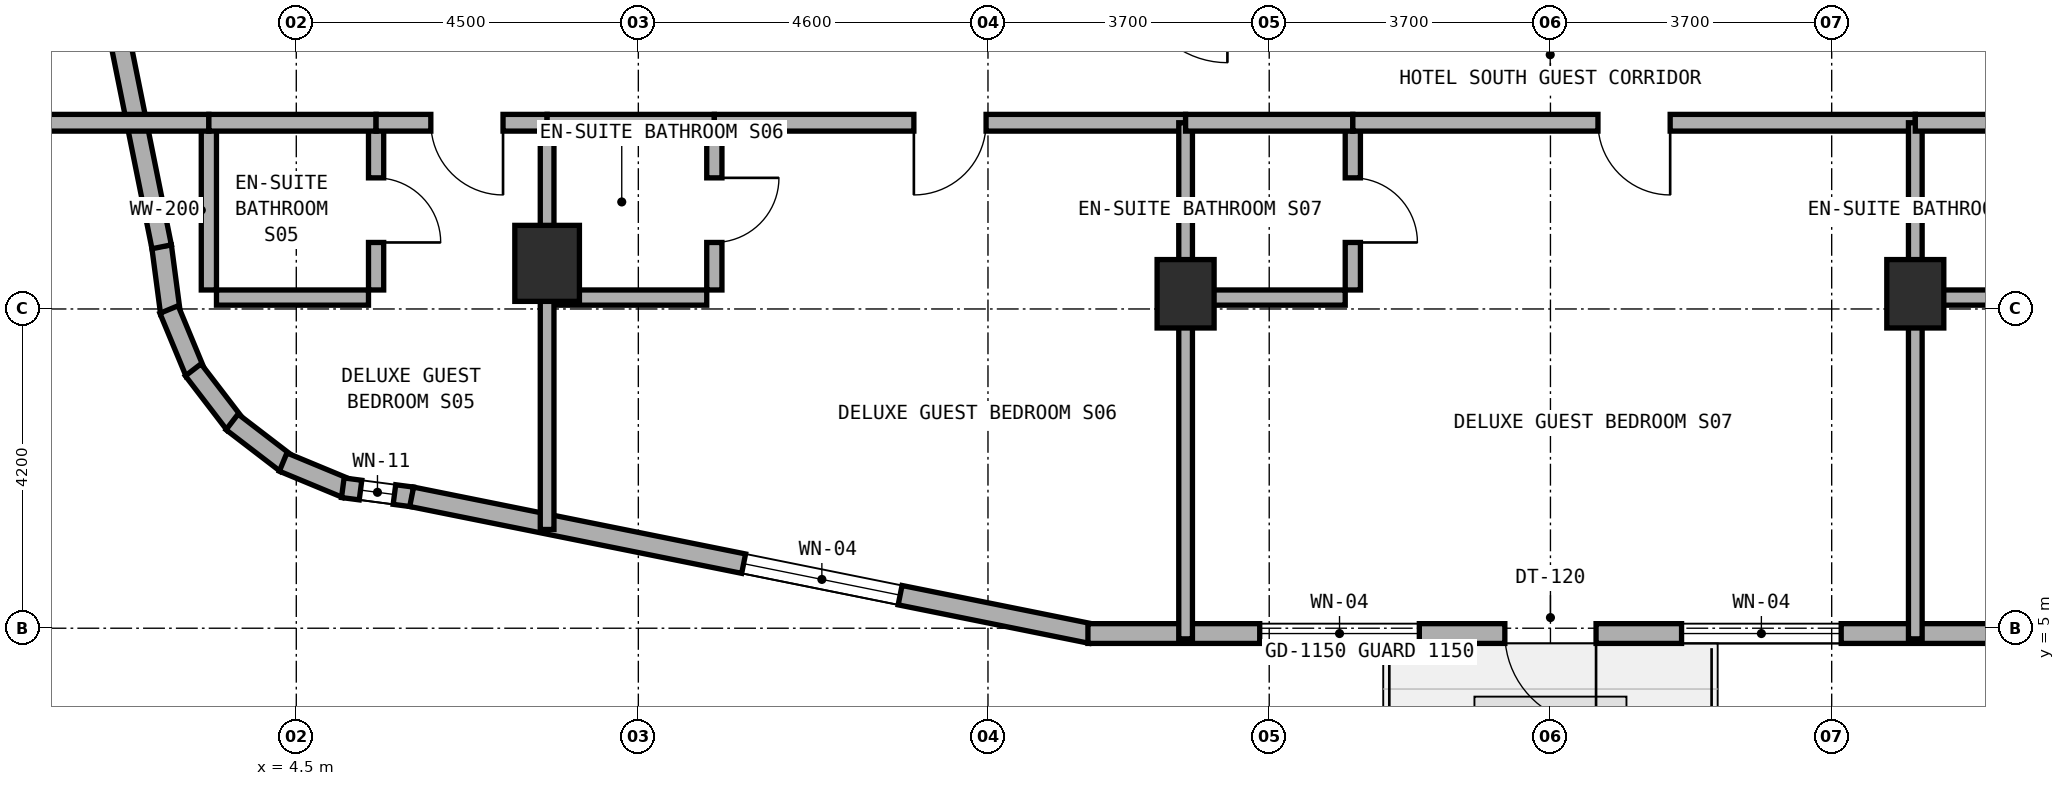
"""IFC4 building model, lengths in metres.
Left out: names, types, materials, properties, quantities, classifications, styles, units other than length and angle.
Written with IfcOpenShell. Run it as: python <this file> out.ifc"""

import sys

from ifc_helpers import new_model, si_unit, direction, frame, frame_2d, origin, origin_2d, place, context, subcontext, project, spatial, rectangle, extrude, element, fill, save


model = new_model("IFC4")
c1 = context("Model", 3, precision=1e-05, world=origin(), true_north=direction((0.0, 1.0)))
c2 = subcontext(c1, "Body", "Model", "MODEL_VIEW")
j1 = project(units=[si_unit("LENGTHUNIT", "METRE"), si_unit("PLANEANGLEUNIT", "RADIAN")], contexts=[c1])
p1 = place(None, origin())
s1 = spatial("IfcSite", under=j1, at=p1, CompositionType="ELEMENT")
p2 = place(p1, origin())
s2 = spatial("IfcBuilding", under=s1, at=p2, CompositionType="ELEMENT")
p3 = place(p2, frame((0.0, 0.0, 155.5)))
s3 = spatial("IfcBuildingStorey", under=s2, at=p3, CompositionType="ELEMENT", Elevation=155.5)
for number, where, z_axis, x_axis in (
    (1, (16.2, 9.4, 0.0), (0.0, 0.0, 1.0), (1.0, 0.0, 0.0)),
    (2, (25.8, 9.4, 0.0), (0.0, 0.0, 1.0), (1.0, 0.0, 0.0)),
):
    element("IfcColumn", number, at=place(p3, frame(where, z_axis=z_axis, x_axis=x_axis)), inside=s3, PredefinedType="COLUMN", context=c2, shape_type="SweptSolid", body=[
        extrude(rectangle(XDim=0.75, YDim=0.9, at=origin_2d()), origin(), (0.0, 0.0, 1.0), 3.5),
    ])
p4 = place(p3, frame((7.8, 9.8, 0.0), z_axis=(0.0, 0.0, 1.0), x_axis=(1.0, 0.0, 0.0)))
e3 = element("IfcColumn", 3, at=p4, inside=s3, PredefinedType="COLUMN", context=c2, shape_type="SweptSolid", body=[
    extrude(rectangle(XDim=0.85, YDim=1.0, at=origin_2d()), origin(), (0.0, 0.0, 1.0), 3.5),
])
p5 = place(p3, frame((2.728, 10.025, 0.0), z_axis=(0.0, 0.0, 1.0), x_axis=(0.130953706898, -0.991388484223, 0.0)))
e4 = element("IfcWall", 4, at=p5, inside=s3, PredefinedType="STANDARD", context=c2, shape_type="SweptSolid", body=[
    extrude(rectangle(XDim=0.885, YDim=0.26, at=frame_2d((0.443, 0.0))), origin(), (0.0, 0.0, 1.0), 3.22),
])
p6 = place(p3, frame((2.826, 9.193, 0.0), z_axis=(0.0, 0.0, 1.0), x_axis=(0.383290660547, -0.923627776508, 0.0)))
e5 = element("IfcWall", 5, at=p6, inside=s3, PredefinedType="STANDARD", context=c2, shape_type="SweptSolid", body=[
    extrude(rectangle(XDim=0.903, YDim=0.26, at=frame_2d((0.452, 0.0))), origin(), (0.0, 0.0, 1.0), 3.22),
])
p7 = place(p3, frame((3.144, 8.399, 0.0), z_axis=(0.0, 0.0, 1.0), x_axis=(0.608624690463, -0.793458244748, 0.0)))
e6 = element("IfcWall", 6, at=p7, inside=s3, PredefinedType="STANDARD", context=c2, shape_type="SweptSolid", body=[
    extrude(rectangle(XDim=0.902, YDim=0.26, at=frame_2d((0.451, 0.0))), origin(), (0.0, 0.0, 1.0), 3.22),
])
p8 = place(p3, frame((3.655, 7.714, 0.0), z_axis=(0.0, 0.0, 1.0), x_axis=(0.793558456666, -0.608494022858, 0.0)))
e7 = element("IfcWall", 7, at=p8, inside=s3, PredefinedType="STANDARD", context=c2, shape_type="SweptSolid", body=[
    extrude(rectangle(XDim=0.902, YDim=0.26, at=frame_2d((0.451, 0.0))), origin(), (0.0, 0.0, 1.0), 3.22),
])
p9 = place(p3, frame((4.327, 7.186, 0.0), z_axis=(0.0, 0.0, 1.0), x_axis=(0.923683767999, -0.383155708213, 0.0)))
e8 = element("IfcWall", 8, at=p9, inside=s3, PredefinedType="STANDARD", context=c2, shape_type="SweptSolid", body=[
    extrude(rectangle(XDim=0.903, YDim=0.26, at=frame_2d((0.451, 0.0))), origin(), (0.0, 0.0, 1.0), 3.22),
])
p10 = place(p3, frame((5.112, 6.848, 0.0), z_axis=(0.0, 0.0, 1.0), x_axis=(0.991487658083, -0.130200706103, 0.0)))
e9 = element("IfcWall", 9, at=p10, inside=s3, PredefinedType="STANDARD", context=c2, shape_type="SweptSolid", body=[
    extrude(rectangle(XDim=0.921, YDim=0.26, at=frame_2d((0.46, 0.0))), origin(), (0.0, 0.0, 1.0), 3.22),
])
p11 = place(p10, frame((0.235, 0.0, 0.85)))
e10 = element("IfcOpeningElement", 10, at=p11, cuts=e9, PredefinedType="OPENING", context=c2, shape_type="SweptSolid", body=[
    extrude(rectangle(XDim=0.45, YDim=1.5, at=frame_2d((0.225, 0.75))), frame((0.0, 0.14, 0.0), z_axis=(0.0, -1.0, 0.0), x_axis=(1.0, 0.0, 0.0)), (0.0, 0.0, 1.0), 0.28),
])
p12 = place(p3, frame((6.018, 6.729, 0.0), z_axis=(0.0, 0.0, 1.0), x_axis=(0.980317172899, -0.197429077186, 0.0)))
e11 = element("IfcWall", 11, at=p12, inside=s3, PredefinedType="STANDARD", context=c2, shape_type="SweptSolid", body=[
    extrude(rectangle(XDim=9.117, YDim=0.26, at=frame_2d((4.559, 0.0))), origin(), (0.0, 0.0, 1.0), 3.22),
])
p13 = place(p12, frame((4.455, 0.0, 0.85)))
e12 = element("IfcOpeningElement", 12, at=p13, cuts=e11, PredefinedType="OPENING", context=c2, shape_type="SweptSolid", body=[
    extrude(rectangle(XDim=2.1, YDim=1.5, at=frame_2d((1.05, 0.75))), frame((0.0, 0.14, 0.0), z_axis=(0.0, -1.0, 0.0), x_axis=(1.0, 0.0, 0.0)), (0.0, 0.0, 1.0), 0.28),
])
p14 = place(p3, frame((14.915, 4.93, 0.0), z_axis=(0.0, 0.0, 1.0), x_axis=(1.0, 0.0, 0.0)))
e13 = element("IfcWall", 13, at=p14, inside=s3, PredefinedType="STANDARD", context=c2, shape_type="SweptSolid", body=[
    extrude(rectangle(XDim=12.135, YDim=0.26, at=frame_2d((6.067, 0.0))), origin(), (0.0, 0.0, 1.0), 3.22),
])
p15 = place(p14, frame((5.485, 0.0, 0.0)))
e14 = element("IfcOpeningElement", 14, at=p15, cuts=e13, PredefinedType="OPENING", context=c2, shape_type="SweptSolid", body=[
    extrude(rectangle(XDim=1.2, YDim=2.15, at=frame_2d((0.6, 1.075))), frame((0.0, 0.14, 0.0), z_axis=(0.0, -1.0, 0.0), x_axis=(1.0, 0.0, 0.0)), (0.0, 0.0, 1.0), 0.28),
])
p16 = place(p14, frame((2.26, 0.0, 0.85)))
e15 = element("IfcOpeningElement", 15, at=p16, cuts=e13, PredefinedType="OPENING", context=c2, shape_type="SweptSolid", body=[
    extrude(rectangle(XDim=2.1, YDim=1.5, at=frame_2d((1.05, 0.75))), frame((0.0, 0.14, 0.0), z_axis=(0.0, -1.0, 0.0), x_axis=(1.0, 0.0, 0.0)), (0.0, 0.0, 1.0), 0.28),
])
p17 = place(p14, frame((7.81, 0.0, 0.85)))
e16 = element("IfcOpeningElement", 16, at=p17, cuts=e13, PredefinedType="OPENING", context=c2, shape_type="SweptSolid", body=[
    extrude(rectangle(XDim=2.1, YDim=1.5, at=frame_2d((1.05, 0.75))), frame((0.0, 0.14, 0.0), z_axis=(0.0, -1.0, 0.0), x_axis=(1.0, 0.0, 0.0)), (0.0, 0.0, 1.0), 0.28),
])
p18 = place(p3, frame((0.916, 19.02, 0.0), z_axis=(0.0, 0.0, 1.0), x_axis=(0.197435082048, -0.980315963543, 0.0)))
e17 = element("IfcWall", 17, at=p18, inside=s3, PredefinedType="STANDARD", context=c2, shape_type="SweptSolid", body=[
    extrude(rectangle(XDim=9.183, YDim=0.26, at=frame_2d((4.591, 0.0))), origin(), (0.0, 0.0, 1.0), 3.22),
])
p19 = place(p18, frame((2.647, 0.0, 0.85)))
e18 = element("IfcOpeningElement", 18, at=p19, cuts=e17, PredefinedType="OPENING", context=c2, shape_type="SweptSolid", body=[
    extrude(rectangle(XDim=2.1, YDim=1.5, at=frame_2d((1.05, 0.75))), frame((0.0, 0.14, 0.0), z_axis=(0.0, -1.0, 0.0), x_axis=(1.0, 0.0, 0.0)), (0.0, 0.0, 1.0), 0.28),
])
p20 = place(p3, frame((5.55, 9.45, 0.0), z_axis=(0.0, 0.0, 1.0), x_axis=(0.0, 1.0, 0.0)))
e19 = element("IfcWall", 19, at=p20, inside=s3, PredefinedType="PLUMBINGWALL", context=c2, shape_type="SweptSolid", body=[
    extrude(rectangle(XDim=2.1, YDim=0.2, at=frame_2d((1.05, 0.0))), origin(), (0.0, 0.0, 1.0), 3.22),
])
p21 = place(p20, frame((0.625, 0.0, 0.0)))
e20 = element("IfcOpeningElement", 20, at=p21, cuts=e19, PredefinedType="OPENING", context=c2, shape_type="SweptSolid", body=[
    extrude(rectangle(XDim=0.85, YDim=2.1, at=frame_2d((0.425, 1.05))), frame((0.0, 0.11, 0.0), z_axis=(0.0, -1.0, 0.0), x_axis=(1.0, 0.0, 0.0)), (0.0, 0.0, 1.0), 0.22),
])
p22 = place(p3, frame((3.45, 9.35, 0.0), z_axis=(0.0, 0.0, 1.0), x_axis=(1.0, 0.0, 0.0)))
e21 = element("IfcWall", 21, at=p22, inside=s3, PredefinedType="PLUMBINGWALL", context=c2, shape_type="SweptSolid", body=[
    extrude(rectangle(XDim=2.0, YDim=0.2, at=frame_2d((1.0, 0.0))), origin(), (0.0, 0.0, 1.0), 3.22),
])
p23 = place(p3, frame((3.35, 9.45, 0.0), z_axis=(0.0, 0.0, 1.0), x_axis=(0.0, 1.0, 0.0)))
e22 = element("IfcWall", 22, at=p23, inside=s3, PredefinedType="PLUMBINGWALL", context=c2, shape_type="SweptSolid", body=[
    extrude(rectangle(XDim=2.1, YDim=0.2, at=frame_2d((1.05, 0.0))), origin(), (0.0, 0.0, 1.0), 3.22),
])
p24 = place(p3, frame((0.96, 11.65, 0.0), z_axis=(0.0, 0.0, 1.0), x_axis=(1.0, 0.0, 0.0)))
e23 = element("IfcWall", 23, at=p24, inside=s3, PredefinedType="SOLIDWALL", context=c2, shape_type="SweptSolid", body=[
    extrude(rectangle(XDim=2.39, YDim=0.22, at=frame_2d((1.195, 0.0))), origin(), (0.0, 0.0, 1.0), 3.22),
])
p25 = place(p3, frame((3.35, 11.65, 0.0), z_axis=(0.0, 0.0, 1.0), x_axis=(1.0, 0.0, 0.0)))
e24 = element("IfcWall", 24, at=p25, inside=s3, PredefinedType="SOLIDWALL", context=c2, shape_type="SweptSolid", body=[
    extrude(rectangle(XDim=2.2, YDim=0.22, at=frame_2d((1.1, 0.0))), origin(), (0.0, 0.0, 1.0), 3.22),
])
p26 = place(p3, frame((5.55, 11.65, 0.0), z_axis=(0.0, 0.0, 1.0), x_axis=(1.0, 0.0, 0.0)))
e25 = element("IfcWall", 25, at=p26, inside=s3, PredefinedType="SOLIDWALL", context=c2, shape_type="SweptSolid", body=[
    extrude(rectangle(XDim=2.25, YDim=0.22, at=frame_2d((1.125, 0.0))), origin(), (0.0, 0.0, 1.0), 2.795),
])
p27 = place(p26, frame((0.72, 0.0, 0.0)))
e26 = element("IfcOpeningElement", 26, at=p27, cuts=e25, PredefinedType="OPENING", context=c2, shape_type="SweptSolid", body=[
    extrude(rectangle(XDim=0.95, YDim=2.1, at=frame_2d((0.475, 1.05))), frame((0.0, 0.12, 0.0), z_axis=(0.0, -1.0, 0.0), x_axis=(1.0, 0.0, 0.0)), (0.0, 0.0, 1.0), 0.24),
])
p28 = place(p3, frame((7.8, 6.299, 0.0), z_axis=(0.0, 0.0, 1.0), x_axis=(0.0, 1.0, 0.0)))
e27 = element("IfcWall", 27, at=p28, inside=s3, PredefinedType="SOLIDWALL", context=c2, shape_type="SweptSolid", body=[
    extrude(rectangle(XDim=5.351, YDim=0.18, at=frame_2d((2.675, 0.0))), origin(), (0.0, 0.0, 1.0), 2.795),
])
p29 = place(p3, frame((10.0, 9.45, 0.0), z_axis=(0.0, 0.0, 1.0), x_axis=(0.0, 1.0, 0.0)))
e28 = element("IfcWall", 28, at=p29, inside=s3, PredefinedType="PLUMBINGWALL", context=c2, shape_type="SweptSolid", body=[
    extrude(rectangle(XDim=2.1, YDim=0.2, at=frame_2d((1.05, 0.0))), origin(), (0.0, 0.0, 1.0), 2.795),
])
p30 = place(p29, frame((0.625, 0.0, 0.0)))
e29 = element("IfcOpeningElement", 29, at=p30, cuts=e28, PredefinedType="OPENING", context=c2, shape_type="SweptSolid", body=[
    extrude(rectangle(XDim=0.85, YDim=2.1, at=frame_2d((0.425, 1.05))), frame((0.0, 0.11, 0.0), z_axis=(0.0, -1.0, 0.0), x_axis=(1.0, 0.0, 0.0)), (0.0, 0.0, 1.0), 0.22),
])
p31 = place(p3, frame((7.9, 9.35, 0.0), z_axis=(0.0, 0.0, 1.0), x_axis=(1.0, 0.0, 0.0)))
e30 = element("IfcWall", 30, at=p31, inside=s3, PredefinedType="PLUMBINGWALL", context=c2, shape_type="SweptSolid", body=[
    extrude(rectangle(XDim=2.0, YDim=0.2, at=frame_2d((1.0, 0.0))), origin(), (0.0, 0.0, 1.0), 3.22),
])
p32 = place(p3, frame((7.8, 11.65, 0.0), z_axis=(0.0, 0.0, 1.0), x_axis=(1.0, 0.0, 0.0)))
e31 = element("IfcWall", 31, at=p32, inside=s3, PredefinedType="SOLIDWALL", context=c2, shape_type="SweptSolid", body=[
    extrude(rectangle(XDim=2.2, YDim=0.22, at=frame_2d((1.1, 0.0))), origin(), (0.0, 0.0, 1.0), 2.795),
])
p33 = place(p3, frame((10.0, 11.65, 0.0), z_axis=(0.0, 0.0, 1.0), x_axis=(1.0, 0.0, 0.0)))
e32 = element("IfcWall", 32, at=p33, inside=s3, PredefinedType="SOLIDWALL", context=c2, shape_type="SweptSolid", body=[
    extrude(rectangle(XDim=6.2, YDim=0.22, at=frame_2d((3.1, 0.0))), origin(), (0.0, 0.0, 1.0), 2.795),
])
p34 = place(p33, frame((2.625, 0.0, 0.0)))
e33 = element("IfcOpeningElement", 33, at=p34, cuts=e32, PredefinedType="OPENING", context=c2, shape_type="SweptSolid", body=[
    extrude(rectangle(XDim=0.95, YDim=2.1, at=frame_2d((0.475, 1.05))), frame((0.0, 0.12, 0.0), z_axis=(0.0, -1.0, 0.0), x_axis=(1.0, 0.0, 0.0)), (0.0, 0.0, 1.0), 0.24),
])
p35 = place(p3, frame((16.2, 4.86, 0.0), z_axis=(0.0, 0.0, 1.0), x_axis=(0.0, 1.0, 0.0)))
e34 = element("IfcWall", 34, at=p35, inside=s3, PredefinedType="SOLIDWALL", context=c2, shape_type="SweptSolid", body=[
    extrude(rectangle(XDim=6.79, YDim=0.18, at=frame_2d((3.395, 0.0))), origin(), (0.0, 0.0, 1.0), 2.795),
])
p36 = place(p3, frame((18.4, 9.45, 0.0), z_axis=(0.0, 0.0, 1.0), x_axis=(0.0, 1.0, 0.0)))
e35 = element("IfcWall", 35, at=p36, inside=s3, PredefinedType="PLUMBINGWALL", context=c2, shape_type="SweptSolid", body=[
    extrude(rectangle(XDim=2.1, YDim=0.2, at=frame_2d((1.05, 0.0))), origin(), (0.0, 0.0, 1.0), 2.795),
])
p37 = place(p36, frame((0.625, 0.0, 0.0)))
e36 = element("IfcOpeningElement", 36, at=p37, cuts=e35, PredefinedType="OPENING", context=c2, shape_type="SweptSolid", body=[
    extrude(rectangle(XDim=0.85, YDim=2.1, at=frame_2d((0.425, 1.05))), frame((0.0, 0.11, 0.0), z_axis=(0.0, -1.0, 0.0), x_axis=(1.0, 0.0, 0.0)), (0.0, 0.0, 1.0), 0.22),
])
p38 = place(p3, frame((16.3, 9.35, 0.0), z_axis=(0.0, 0.0, 1.0), x_axis=(1.0, 0.0, 0.0)))
e37 = element("IfcWall", 37, at=p38, inside=s3, PredefinedType="PLUMBINGWALL", context=c2, shape_type="SweptSolid", body=[
    extrude(rectangle(XDim=2.0, YDim=0.2, at=frame_2d((1.0, 0.0))), origin(), (0.0, 0.0, 1.0), 2.835),
])
p39 = place(p3, frame((16.2, 11.65, 0.0), z_axis=(0.0, 0.0, 1.0), x_axis=(1.0, 0.0, 0.0)))
e38 = element("IfcWall", 38, at=p39, inside=s3, PredefinedType="SOLIDWALL", context=c2, shape_type="SweptSolid", body=[
    extrude(rectangle(XDim=2.2, YDim=0.22, at=frame_2d((1.1, 0.0))), origin(), (0.0, 0.0, 1.0), 2.795),
])
p40 = place(p3, frame((18.4, 11.65, 0.0), z_axis=(0.0, 0.0, 1.0), x_axis=(1.0, 0.0, 0.0)))
e39 = element("IfcWall", 39, at=p40, inside=s3, PredefinedType="SOLIDWALL", context=c2, shape_type="SweptSolid", body=[
    extrude(rectangle(XDim=7.4, YDim=0.22, at=frame_2d((3.7, 0.0))), origin(), (0.0, 0.0, 1.0), 2.795),
])
p41 = place(p40, frame((3.225, 0.0, 0.0)))
e40 = element("IfcOpeningElement", 40, at=p41, cuts=e39, PredefinedType="OPENING", context=c2, shape_type="SweptSolid", body=[
    extrude(rectangle(XDim=0.95, YDim=2.1, at=frame_2d((0.475, 1.05))), frame((0.0, 0.12, 0.0), z_axis=(0.0, -1.0, 0.0), x_axis=(1.0, 0.0, 0.0)), (0.0, 0.0, 1.0), 0.24),
])
p42 = place(p3, frame((25.8, 4.86, 0.0), z_axis=(0.0, 0.0, 1.0), x_axis=(0.0, 1.0, 0.0)))
e41 = element("IfcWall", 41, at=p42, inside=s3, PredefinedType="SOLIDWALL", context=c2, shape_type="SweptSolid", body=[
    extrude(rectangle(XDim=6.79, YDim=0.18, at=frame_2d((3.395, 0.0))), origin(), (0.0, 0.0, 1.0), 2.795),
])
p43 = place(p3, frame((25.9, 9.35, 0.0), z_axis=(0.0, 0.0, 1.0), x_axis=(1.0, 0.0, 0.0)))
e42 = element("IfcWall", 42, at=p43, inside=s3, PredefinedType="PLUMBINGWALL", context=c2, shape_type="SweptSolid", body=[
    extrude(rectangle(XDim=2.0, YDim=0.2, at=frame_2d((1.0, 0.0))), origin(), (0.0, 0.0, 1.0), 2.835),
])
p44 = place(p3, frame((25.8, 11.65, 0.0), z_axis=(0.0, 0.0, 1.0), x_axis=(1.0, 0.0, 0.0)))
e43 = element("IfcWall", 43, at=p44, inside=s3, PredefinedType="SOLIDWALL", context=c2, shape_type="SweptSolid", body=[
    extrude(rectangle(XDim=2.2, YDim=0.22, at=frame_2d((1.1, 0.0))), origin(), (0.0, 0.0, 1.0), 2.795),
])
p45 = place(p13, origin())
e44 = element("IfcWindow", 44, at=p45, inside=s3, PartitioningType="SINGLE_PANEL", PredefinedType="WINDOW", context=c2, shape_type="SweptSolid", body=[
    extrude(rectangle(XDim=2.1, YDim=1.5, at=frame_2d((1.05, 0.75))), frame((0.0, 0.03, 0.0), z_axis=(0.0, -1.0, 0.0), x_axis=(1.0, 0.0, 0.0)), (0.0, 0.0, 1.0), 0.06),
])
fill(e12, e44)
p46 = place(p15, frame((1.2, 0.0, 0.0), z_axis=(0.0, 0.0, 1.0), x_axis=(-1.0, 0.0, 0.0)))
e45 = element("IfcDoor", 45, at=p46, inside=s3, OperationType="SINGLE_SWING_LEFT", PredefinedType="DOOR", context=c2, shape_type="SweptSolid", body=[
    extrude(rectangle(XDim=1.2, YDim=2.15, at=frame_2d((0.6, 1.075))), frame((0.0, 0.025, 0.0), z_axis=(0.0, -1.0, 0.0), x_axis=(1.0, 0.0, 0.0)), (0.0, 0.0, 1.0), 0.05),
])
fill(e14, e45)
p47 = place(p16, origin())
e46 = element("IfcWindow", 46, at=p47, inside=s3, PartitioningType="SINGLE_PANEL", PredefinedType="WINDOW", context=c2, shape_type="SweptSolid", body=[
    extrude(rectangle(XDim=2.1, YDim=1.5, at=frame_2d((1.05, 0.75))), frame((0.0, 0.03, 0.0), z_axis=(0.0, -1.0, 0.0), x_axis=(1.0, 0.0, 0.0)), (0.0, 0.0, 1.0), 0.06),
])
fill(e15, e46)
p48 = place(p17, origin())
e47 = element("IfcWindow", 47, at=p48, inside=s3, PartitioningType="SINGLE_PANEL", PredefinedType="WINDOW", context=c2, shape_type="SweptSolid", body=[
    extrude(rectangle(XDim=2.1, YDim=1.5, at=frame_2d((1.05, 0.75))), frame((0.0, 0.03, 0.0), z_axis=(0.0, -1.0, 0.0), x_axis=(1.0, 0.0, 0.0)), (0.0, 0.0, 1.0), 0.06),
])
fill(e16, e47)
p49 = place(p11, origin())
e48 = element("IfcWindow", 48, at=p49, inside=s3, PartitioningType="SINGLE_PANEL", PredefinedType="WINDOW", context=c2, shape_type="SweptSolid", body=[
    extrude(rectangle(XDim=0.45, YDim=1.5, at=frame_2d((0.225, 0.75))), frame((0.0, 0.03, 0.0), z_axis=(0.0, -1.0, 0.0), x_axis=(1.0, 0.0, 0.0)), (0.0, 0.0, 1.0), 0.06),
])
fill(e10, e48)
p50 = place(p21, frame((0.85, 0.0, 0.0), z_axis=(0.0, 0.0, 1.0), x_axis=(-1.0, 0.0, 0.0)))
e49 = element("IfcDoor", 49, at=p50, inside=s3, OperationType="SINGLE_SWING_RIGHT", PredefinedType="DOOR", context=c2, shape_type="SweptSolid", body=[
    extrude(rectangle(XDim=0.85, YDim=2.1, at=frame_2d((0.425, 1.05))), frame((0.0, 0.025, 0.0), z_axis=(0.0, -1.0, 0.0), x_axis=(1.0, 0.0, 0.0)), (0.0, 0.0, 1.0), 0.05),
])
fill(e20, e49)
p51 = place(p27, frame((0.95, 0.0, 0.0), z_axis=(0.0, 0.0, 1.0), x_axis=(-1.0, 0.0, 0.0)))
e50 = element("IfcDoor", 50, at=p51, inside=s3, OperationType="SINGLE_SWING_LEFT", PredefinedType="DOOR", context=c2, shape_type="SweptSolid", body=[
    extrude(rectangle(XDim=0.95, YDim=2.1, at=frame_2d((0.475, 1.05))), frame((0.0, 0.025, 0.0), z_axis=(0.0, -1.0, 0.0), x_axis=(1.0, 0.0, 0.0)), (0.0, 0.0, 1.0), 0.05),
])
fill(e26, e50)
p52 = place(p30, frame((0.85, 0.0, 0.0), z_axis=(0.0, 0.0, 1.0), x_axis=(-1.0, 0.0, 0.0)))
e51 = element("IfcDoor", 51, at=p52, inside=s3, OperationType="SINGLE_SWING_LEFT", PredefinedType="DOOR", context=c2, shape_type="SweptSolid", body=[
    extrude(rectangle(XDim=0.85, YDim=2.1, at=frame_2d((0.425, 1.05))), frame((0.0, 0.025, 0.0), z_axis=(0.0, -1.0, 0.0), x_axis=(1.0, 0.0, 0.0)), (0.0, 0.0, 1.0), 0.05),
])
fill(e29, e51)
p53 = place(p34, frame((0.95, 0.0, 0.0), z_axis=(0.0, 0.0, 1.0), x_axis=(-1.0, 0.0, 0.0)))
e52 = element("IfcDoor", 52, at=p53, inside=s3, OperationType="SINGLE_SWING_RIGHT", PredefinedType="DOOR", context=c2, shape_type="SweptSolid", body=[
    extrude(rectangle(XDim=0.95, YDim=2.1, at=frame_2d((0.475, 1.05))), frame((0.0, 0.025, 0.0), z_axis=(0.0, -1.0, 0.0), x_axis=(1.0, 0.0, 0.0)), (0.0, 0.0, 1.0), 0.05),
])
fill(e33, e52)
p54 = place(p37, frame((0.85, 0.0, 0.0), z_axis=(0.0, 0.0, 1.0), x_axis=(-1.0, 0.0, 0.0)))
e53 = element("IfcDoor", 53, at=p54, inside=s3, OperationType="SINGLE_SWING_RIGHT", PredefinedType="DOOR", context=c2, shape_type="SweptSolid", body=[
    extrude(rectangle(XDim=0.85, YDim=2.1, at=frame_2d((0.425, 1.05))), frame((0.0, 0.025, 0.0), z_axis=(0.0, -1.0, 0.0), x_axis=(1.0, 0.0, 0.0)), (0.0, 0.0, 1.0), 0.05),
])
fill(e36, e53)
p55 = place(p41, frame((0.95, 0.0, 0.0), z_axis=(0.0, 0.0, 1.0), x_axis=(-1.0, 0.0, 0.0)))
e54 = element("IfcDoor", 54, at=p55, inside=s3, OperationType="SINGLE_SWING_LEFT", PredefinedType="DOOR", context=c2, shape_type="SweptSolid", body=[
    extrude(rectangle(XDim=0.95, YDim=2.1, at=frame_2d((0.475, 1.05))), frame((0.0, 0.025, 0.0), z_axis=(0.0, -1.0, 0.0), x_axis=(1.0, 0.0, 0.0)), (0.0, 0.0, 1.0), 0.05),
])
fill(e40, e54)
save(model, sys.argv[1])
